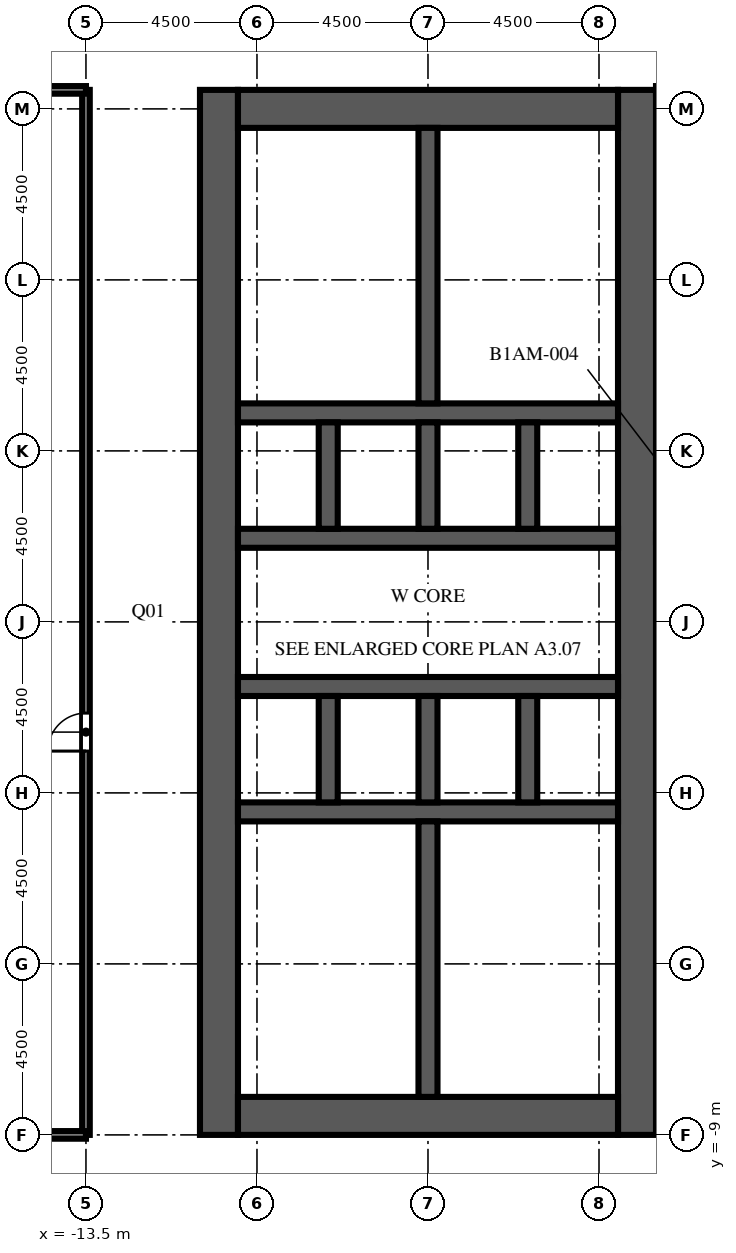
"""IFC4 building model, lengths in metres.
Left out: names, types, materials, properties, quantities, classifications, styles, units other than length and angle.
Written with IfcOpenShell. Run it as: python <this file> out.ifc"""

import sys

from ifc_helpers import new_model, si_unit, direction, frame, frame_2d, origin, place, context, subcontext, project, spatial, rectangle, extrude, element, fill, save


model = new_model("IFC4")
c1 = context("Model", 3, precision=1e-05, world=origin(), true_north=direction((0.0, 1.0)))
c2 = subcontext(c1, "Body", "Model", "MODEL_VIEW")
j1 = project(units=[si_unit("LENGTHUNIT", "METRE"), si_unit("PLANEANGLEUNIT", "RADIAN")], contexts=[c1])
p1 = place(None, origin())
s1 = spatial("IfcSite", under=j1, at=p1, CompositionType="ELEMENT")
p2 = place(p1, origin())
s2 = spatial("IfcBuilding", under=s1, at=p2, CompositionType="ELEMENT")
p3 = place(p2, frame((0.0, 0.0, 35.9)))
s3 = spatial("IfcBuildingStorey", under=s2, at=p3, CompositionType="ELEMENT", Elevation=35.9)
p4 = place(p3, frame((-10.0, -9.0, 0.0), z_axis=(0.0, 0.0, 1.0), x_axis=(0.0, 1.0, 0.0)))
e1 = element("IfcWall", 1, at=p4, inside=s3, PredefinedType="SHEAR", context=c2, shape_type="SweptSolid", body=[
    extrude(rectangle(XDim=27.5, YDim=1.0, at=frame_2d((13.75, 0.0))), origin(), (0.0, 0.0, 1.0), 6.0),
])
p5 = place(p4, frame((12.55, 0.0, 0.0)))
e2 = element("IfcOpeningElement", 2, at=p5, cuts=e1, PredefinedType="OPENING", context=c2, shape_type="SweptSolid", body=[
    extrude(rectangle(XDim=2.4, YDim=2.4, at=frame_2d((1.2, 1.2))), frame((0.0, 0.51, 0.0), z_axis=(0.0, -1.0, 0.0), x_axis=(1.0, 0.0, 0.0)), (0.0, 0.0, 1.0), 1.02),
])
p6 = place(p4, frame((6.825, 0.0, 0.0)))
e3 = element("IfcOpeningElement", 3, at=p6, cuts=e1, PredefinedType="OPENING", context=c2, shape_type="SweptSolid", body=[
    extrude(rectangle(XDim=1.2, YDim=2.1, at=frame_2d((0.6, 1.05))), frame((0.0, 0.51, 0.0), z_axis=(0.0, -1.0, 0.0), x_axis=(1.0, 0.0, 0.0)), (0.0, 0.0, 1.0), 1.02),
])
p7 = place(p4, frame((19.475, 0.0, 0.0)))
e4 = element("IfcOpeningElement", 4, at=p7, cuts=e1, PredefinedType="OPENING", context=c2, shape_type="SweptSolid", body=[
    extrude(rectangle(XDim=1.2, YDim=2.1, at=frame_2d((0.6, 1.05))), frame((0.0, 0.51, 0.0), z_axis=(0.0, -1.0, 0.0), x_axis=(1.0, 0.0, 0.0)), (0.0, 0.0, 1.0), 1.02),
])
p8 = place(p3, frame((1.0, -9.0, 0.0), z_axis=(0.0, 0.0, 1.0), x_axis=(0.0, 1.0, 0.0)))
e5 = element("IfcWall", 5, at=p8, inside=s3, PredefinedType="SHEAR", context=c2, shape_type="SweptSolid", body=[
    extrude(rectangle(XDim=27.5, YDim=1.0, at=frame_2d((13.75, 0.0))), origin(), (0.0, 0.0, 1.0), 6.0),
])
p9 = place(p8, frame((12.55, 0.0, 0.0)))
e6 = element("IfcOpeningElement", 6, at=p9, cuts=e5, PredefinedType="OPENING", context=c2, shape_type="SweptSolid", body=[
    extrude(rectangle(XDim=2.4, YDim=2.4, at=frame_2d((1.2, 1.2))), frame((0.0, 0.51, 0.0), z_axis=(0.0, -1.0, 0.0), x_axis=(1.0, 0.0, 0.0)), (0.0, 0.0, 1.0), 1.02),
])
p10 = place(p8, frame((4.025, 0.0, 0.0)))
e7 = element("IfcOpeningElement", 7, at=p10, cuts=e5, PredefinedType="OPENING", context=c2, shape_type="SweptSolid", body=[
    extrude(rectangle(XDim=1.2, YDim=2.1, at=frame_2d((0.6, 1.05))), frame((0.0, 0.51, 0.0), z_axis=(0.0, -1.0, 0.0), x_axis=(1.0, 0.0, 0.0)), (0.0, 0.0, 1.0), 1.02),
])
p11 = place(p8, frame((19.475, 0.0, 0.0)))
e8 = element("IfcOpeningElement", 8, at=p11, cuts=e5, PredefinedType="OPENING", context=c2, shape_type="SweptSolid", body=[
    extrude(rectangle(XDim=1.0, YDim=2.1, at=frame_2d((0.5, 1.05))), frame((0.0, 0.51, 0.0), z_axis=(0.0, -1.0, 0.0), x_axis=(1.0, 0.0, 0.0)), (0.0, 0.0, 1.0), 1.02),
])
p12 = place(p8, frame((21.106, 0.0, 0.0)))
e9 = element("IfcOpeningElement", 9, at=p12, cuts=e5, PredefinedType="OPENING", context=c2, shape_type="SweptSolid", body=[
    extrude(rectangle(XDim=1.0, YDim=2.1, at=frame_2d((0.5, 1.05))), frame((0.0, 0.51, 0.0), z_axis=(0.0, -1.0, 0.0), x_axis=(1.0, 0.0, 0.0)), (0.0, 0.0, 1.0), 1.02),
])
p13 = place(p8, frame((23.1, 0.0, 0.0)))
e10 = element("IfcOpeningElement", 10, at=p13, cuts=e5, PredefinedType="OPENING", context=c2, shape_type="SweptSolid", body=[
    extrude(rectangle(XDim=1.0, YDim=2.1, at=frame_2d((0.5, 1.05))), frame((0.0, 0.51, 0.0), z_axis=(0.0, -1.0, 0.0), x_axis=(1.0, 0.0, 0.0)), (0.0, 0.0, 1.0), 1.02),
])
p14 = place(p8, frame((25.094, 0.0, 0.0)))
e11 = element("IfcOpeningElement", 11, at=p14, cuts=e5, PredefinedType="OPENING", context=c2, shape_type="SweptSolid", body=[
    extrude(rectangle(XDim=1.0, YDim=2.1, at=frame_2d((0.5, 1.05))), frame((0.0, 0.51, 0.0), z_axis=(0.0, -1.0, 0.0), x_axis=(1.0, 0.0, 0.0)), (0.0, 0.0, 1.0), 1.02),
])
for number, where, z_axis, x_axis in (
    (12, (-9.5, -8.5, 0.0), (0.0, 0.0, 1.0), (1.0, 0.0, 0.0)),
    (13, (-9.5, 18.0, 0.0), (0.0, 0.0, 1.0), (1.0, 0.0, 0.0)),
):
    element("IfcWall", number, at=place(p3, frame(where, z_axis=z_axis, x_axis=x_axis)), inside=s3, PredefinedType="SHEAR", context=c2, shape_type="SweptSolid", body=[
        extrude(rectangle(XDim=10.0, YDim=1.0, at=frame_2d((5.0, 0.0))), origin(), (0.0, 0.0, 1.0), 6.0),
    ])
p15 = place(p3, frame((-9.5, -0.5, 0.0), z_axis=(0.0, 0.0, 1.0), x_axis=(1.0, 0.0, 0.0)))
e14 = element("IfcWall", 14, at=p15, inside=s3, PredefinedType="SHEAR", context=c2, shape_type="SweptSolid", body=[
    extrude(rectangle(XDim=10.0, YDim=0.5, at=frame_2d((5.0, 0.0))), origin(), (0.0, 0.0, 1.0), 6.0),
])
p16 = place(p3, frame((-9.5, 2.8, 0.0), z_axis=(0.0, 0.0, 1.0), x_axis=(1.0, 0.0, 0.0)))
e15 = element("IfcWall", 15, at=p16, inside=s3, PredefinedType="SHEAR", context=c2, shape_type="SweptSolid", body=[
    extrude(rectangle(XDim=10.0, YDim=0.5, at=frame_2d((5.0, 0.0))), origin(), (0.0, 0.0, 1.0), 6.0),
])
p17 = place(p16, frame((0.512, 0.0, 0.0)))
e16 = element("IfcOpeningElement", 16, at=p17, cuts=e15, PredefinedType="OPENING", context=c2, shape_type="SweptSolid", body=[
    extrude(rectangle(XDim=1.1, YDim=2.1, at=frame_2d((0.55, 1.05))), frame((0.0, 0.26, 0.0), z_axis=(0.0, -1.0, 0.0), x_axis=(1.0, 0.0, 0.0)), (0.0, 0.0, 1.0), 0.52),
])
p18 = place(p16, frame((3.137, 0.0, 0.0)))
e17 = element("IfcOpeningElement", 17, at=p18, cuts=e15, PredefinedType="OPENING", context=c2, shape_type="SweptSolid", body=[
    extrude(rectangle(XDim=1.1, YDim=2.1, at=frame_2d((0.55, 1.05))), frame((0.0, 0.26, 0.0), z_axis=(0.0, -1.0, 0.0), x_axis=(1.0, 0.0, 0.0)), (0.0, 0.0, 1.0), 0.52),
])
p19 = place(p16, frame((8.387, 0.0, 0.0)))
e18 = element("IfcOpeningElement", 18, at=p19, cuts=e15, PredefinedType="OPENING", context=c2, shape_type="SweptSolid", body=[
    extrude(rectangle(XDim=1.1, YDim=2.1, at=frame_2d((0.55, 1.05))), frame((0.0, 0.26, 0.0), z_axis=(0.0, -1.0, 0.0), x_axis=(1.0, 0.0, 0.0)), (0.0, 0.0, 1.0), 0.52),
])
p20 = place(p3, frame((-9.5, 6.7, 0.0), z_axis=(0.0, 0.0, 1.0), x_axis=(1.0, 0.0, 0.0)))
e19 = element("IfcWall", 19, at=p20, inside=s3, PredefinedType="SHEAR", context=c2, shape_type="SweptSolid", body=[
    extrude(rectangle(XDim=10.0, YDim=0.5, at=frame_2d((5.0, 0.0))), origin(), (0.0, 0.0, 1.0), 6.0),
])
p21 = place(p20, frame((0.512, 0.0, 0.0)))
e20 = element("IfcOpeningElement", 20, at=p21, cuts=e19, PredefinedType="OPENING", context=c2, shape_type="SweptSolid", body=[
    extrude(rectangle(XDim=1.1, YDim=2.1, at=frame_2d((0.55, 1.05))), frame((0.0, 0.26, 0.0), z_axis=(0.0, -1.0, 0.0), x_axis=(1.0, 0.0, 0.0)), (0.0, 0.0, 1.0), 0.52),
])
p22 = place(p20, frame((3.188, 0.0, 0.0)))
e21 = element("IfcOpeningElement", 21, at=p22, cuts=e19, PredefinedType="OPENING", context=c2, shape_type="SweptSolid", body=[
    extrude(rectangle(XDim=1.0, YDim=2.1, at=frame_2d((0.5, 1.05))), frame((0.0, 0.26, 0.0), z_axis=(0.0, -1.0, 0.0), x_axis=(1.0, 0.0, 0.0)), (0.0, 0.0, 1.0), 0.52),
])
p23 = place(p20, frame((5.812, 0.0, 0.0)))
e22 = element("IfcOpeningElement", 22, at=p23, cuts=e19, PredefinedType="OPENING", context=c2, shape_type="SweptSolid", body=[
    extrude(rectangle(XDim=1.0, YDim=2.1, at=frame_2d((0.5, 1.05))), frame((0.0, 0.26, 0.0), z_axis=(0.0, -1.0, 0.0), x_axis=(1.0, 0.0, 0.0)), (0.0, 0.0, 1.0), 0.52),
])
p24 = place(p20, frame((8.438, 0.0, 0.0)))
e23 = element("IfcOpeningElement", 23, at=p24, cuts=e19, PredefinedType="OPENING", context=c2, shape_type="SweptSolid", body=[
    extrude(rectangle(XDim=1.0, YDim=2.1, at=frame_2d((0.5, 1.05))), frame((0.0, 0.26, 0.0), z_axis=(0.0, -1.0, 0.0), x_axis=(1.0, 0.0, 0.0)), (0.0, 0.0, 1.0), 0.52),
])
p25 = place(p3, frame((-9.5, 10.0, 0.0), z_axis=(0.0, 0.0, 1.0), x_axis=(1.0, 0.0, 0.0)))
e24 = element("IfcWall", 24, at=p25, inside=s3, PredefinedType="SHEAR", context=c2, shape_type="SweptSolid", body=[
    extrude(rectangle(XDim=10.0, YDim=0.5, at=frame_2d((5.0, 0.0))), origin(), (0.0, 0.0, 1.0), 6.0),
])
for number, where, z_axis, x_axis in (
    (25, (-7.125, -0.25, 0.0), (0.0, 0.0, 1.0), (0.0, 1.0, 0.0)),
    (26, (-7.125, 6.95, 0.0), (0.0, 0.0, 1.0), (0.0, 1.0, 0.0)),
    (27, (-4.5, -0.25, 0.0), (0.0, 0.0, 1.0), (0.0, 1.0, 0.0)),
    (28, (-4.5, 6.95, 0.0), (0.0, 0.0, 1.0), (0.0, 1.0, 0.0)),
    (29, (-1.875, -0.25, 0.0), (0.0, 0.0, 1.0), (0.0, 1.0, 0.0)),
    (30, (-1.875, 6.95, 0.0), (0.0, 0.0, 1.0), (0.0, 1.0, 0.0)),
):
    element("IfcWall", number, at=place(p3, frame(where, z_axis=z_axis, x_axis=x_axis)), inside=s3, PredefinedType="SHEAR", context=c2, shape_type="SweptSolid", body=[
        extrude(rectangle(XDim=2.8, YDim=0.5, at=frame_2d((1.4, 0.0))), origin(), (0.0, 0.0, 1.0), 6.0),
    ])
for number, where, z_axis, x_axis in (
    (31, (-4.5, -8.0, 0.0), (0.0, 0.0, 1.0), (0.0, 1.0, 0.0)),
    (32, (-4.5, 10.25, 0.0), (0.0, 0.0, 1.0), (0.0, 1.0, 0.0)),
):
    element("IfcWall", number, at=place(p3, frame(where, z_axis=z_axis, x_axis=x_axis)), inside=s3, PredefinedType="SHEAR", context=c2, shape_type="SweptSolid", body=[
        extrude(rectangle(XDim=7.25, YDim=0.5, at=frame_2d((3.625, 0.0))), origin(), (0.0, 0.0, 1.0), 6.0),
    ])
p26 = place(p3, frame((-1.1, -5.825, 0.0), z_axis=(0.0, 0.0, 1.0), x_axis=(1.0, 0.0, 0.0)))
e33 = element("IfcWall", 33, at=p26, inside=s3, PredefinedType="PARTITIONING", context=c2, shape_type="SweptSolid", body=[
    extrude(rectangle(XDim=1.6, YDim=0.1, at=frame_2d((0.8, 0.0))), origin(), (0.0, 0.0, 1.0), 5.55),
])
p27 = place(p26, frame((0.3, 0.0, 0.0)))
e34 = element("IfcOpeningElement", 34, at=p27, cuts=e33, PredefinedType="OPENING", context=c2, shape_type="SweptSolid", body=[
    extrude(rectangle(XDim=1.0, YDim=2.1, at=frame_2d((0.5, 1.05))), frame((0.0, 0.06, 0.0), z_axis=(0.0, -1.0, 0.0), x_axis=(1.0, 0.0, 0.0)), (0.0, 0.0, 1.0), 0.12),
])
p28 = place(p3, frame((-1.1, -2.925, 0.0), z_axis=(0.0, 0.0, 1.0), x_axis=(1.0, 0.0, 0.0)))
e35 = element("IfcWall", 35, at=p28, inside=s3, PredefinedType="PARTITIONING", context=c2, shape_type="SweptSolid", body=[
    extrude(rectangle(XDim=1.6, YDim=0.1, at=frame_2d((0.8, 0.0))), origin(), (0.0, 0.0, 1.0), 5.55),
])
p29 = place(p28, frame((0.3, 0.0, 0.0)))
e36 = element("IfcOpeningElement", 36, at=p29, cuts=e35, PredefinedType="OPENING", context=c2, shape_type="SweptSolid", body=[
    extrude(rectangle(XDim=1.0, YDim=2.1, at=frame_2d((0.5, 1.05))), frame((0.0, 0.06, 0.0), z_axis=(0.0, -1.0, 0.0), x_axis=(1.0, 0.0, 0.0)), (0.0, 0.0, 1.0), 0.12),
])
p30 = place(p3, frame((-1.1, -5.825, 0.0), z_axis=(0.0, 0.0, 1.0), x_axis=(0.0, 1.0, 0.0)))
e37 = element("IfcWall", 37, at=p30, inside=s3, PredefinedType="PARTITIONING", context=c2, shape_type="SweptSolid", body=[
    extrude(rectangle(XDim=2.9, YDim=0.1, at=frame_2d((1.45, 0.0))), origin(), (0.0, 0.0, 1.0), 5.55),
])
p31 = place(p30, frame((0.95, 0.0, 0.0)))
e38 = element("IfcOpeningElement", 38, at=p31, cuts=e37, PredefinedType="OPENING", context=c2, shape_type="SweptSolid", body=[
    extrude(rectangle(XDim=1.0, YDim=2.1, at=frame_2d((0.5, 1.05))), frame((0.0, 0.06, 0.0), z_axis=(0.0, -1.0, 0.0), x_axis=(1.0, 0.0, 0.0)), (0.0, 0.0, 1.0), 0.12),
])
for number, where, z_axis, x_axis in (
    (39, (-4.25, -5.825, 0.0), (0.0, 0.0, 1.0), (1.0, 0.0, 0.0)),
    (40, (-4.25, -2.925, 0.0), (0.0, 0.0, 1.0), (1.0, 0.0, 0.0)),
):
    element("IfcWall", number, at=place(p3, frame(where, z_axis=z_axis, x_axis=x_axis)), inside=s3, PredefinedType="PARTITIONING", context=c2, shape_type="SweptSolid", body=[
        extrude(rectangle(XDim=3.15, YDim=0.1, at=frame_2d((1.575, 0.0))), origin(), (0.0, 0.0, 1.0), 5.55),
    ])
for number, where, z_axis, x_axis in (
    (41, (-4.25, 11.7, 0.0), (0.0, 0.0, 1.0), (1.0, 0.0, 0.0)),
    (42, (-4.25, 13.512, 0.0), (0.0, 0.0, 1.0), (1.0, 0.0, 0.0)),
    (43, (-4.25, 15.688, 0.0), (0.0, 0.0, 1.0), (1.0, 0.0, 0.0)),
):
    element("IfcWall", number, at=place(p3, frame(where, z_axis=z_axis, x_axis=x_axis)), inside=s3, PredefinedType="PARTITIONING", context=c2, shape_type="SweptSolid", body=[
        extrude(rectangle(XDim=4.75, YDim=0.1, at=frame_2d((2.375, 0.0))), origin(), (0.0, 0.0, 1.0), 5.55),
    ])
p32 = place(p3, frame((-13.5, -9.0, 0.0), z_axis=(0.0, 0.0, 1.0), x_axis=(0.0, 1.0, 0.0)))
e44 = element("IfcWall", 44, at=p32, inside=s3, PredefinedType="PARTITIONING", context=c2, shape_type="SweptSolid", body=[
    extrude(rectangle(XDim=27.5, YDim=0.2, at=frame_2d((13.75, 0.0))), origin(), (0.0, 0.0, 1.0), 5.55),
])
p33 = place(p32, frame((10.1, 0.0, 0.0)))
e45 = element("IfcOpeningElement", 45, at=p33, cuts=e44, PredefinedType="OPENING", context=c2, shape_type="SweptSolid", body=[
    extrude(rectangle(XDim=1.0, YDim=2.1, at=frame_2d((0.5, 1.05))), frame((0.0, 0.11, 0.0), z_axis=(0.0, -1.0, 0.0), x_axis=(1.0, 0.0, 0.0)), (0.0, 0.0, 1.0), 0.22),
])
for number, where, z_axis, x_axis in (
    (46, (-17.2, -9.0, 0.0), (0.0, 0.0, 1.0), (1.0, 0.0, 0.0)),
    (47, (-17.2, 18.5, 0.0), (0.0, 0.0, 1.0), (1.0, 0.0, 0.0)),
):
    element("IfcWall", number, at=place(p3, frame(where, z_axis=z_axis, x_axis=x_axis)), inside=s3, PredefinedType="PARTITIONING", context=c2, shape_type="SweptSolid", body=[
        extrude(rectangle(XDim=3.7, YDim=0.2, at=frame_2d((1.85, 0.0))), origin(), (0.0, 0.0, 1.0), 5.55),
    ])
p34 = place(p17, origin())
e48 = element("IfcDoor", 48, at=p34, inside=s3, OperationType="DOUBLE_DOOR_SLIDING", PredefinedType="DOOR", context=c2, shape_type="SweptSolid", body=[
    extrude(rectangle(XDim=1.1, YDim=2.1, at=frame_2d((0.55, 1.05))), frame((0.0, 0.025, 0.0), z_axis=(0.0, -1.0, 0.0), x_axis=(1.0, 0.0, 0.0)), (0.0, 0.0, 1.0), 0.05),
])
fill(e16, e48)
p35 = place(p18, origin())
e49 = element("IfcDoor", 49, at=p35, inside=s3, OperationType="DOUBLE_DOOR_SLIDING", PredefinedType="DOOR", context=c2, shape_type="SweptSolid", body=[
    extrude(rectangle(XDim=1.1, YDim=2.1, at=frame_2d((0.55, 1.05))), frame((0.0, 0.025, 0.0), z_axis=(0.0, -1.0, 0.0), x_axis=(1.0, 0.0, 0.0)), (0.0, 0.0, 1.0), 0.05),
])
fill(e17, e49)
p36 = place(p19, origin())
e50 = element("IfcDoor", 50, at=p36, inside=s3, OperationType="DOUBLE_DOOR_SLIDING", PredefinedType="DOOR", context=c2, shape_type="SweptSolid", body=[
    extrude(rectangle(XDim=1.1, YDim=2.1, at=frame_2d((0.55, 1.05))), frame((0.0, 0.025, 0.0), z_axis=(0.0, -1.0, 0.0), x_axis=(1.0, 0.0, 0.0)), (0.0, 0.0, 1.0), 0.05),
])
fill(e18, e50)
p37 = place(p21, origin())
e51 = element("IfcDoor", 51, at=p37, inside=s3, OperationType="DOUBLE_DOOR_SLIDING", PredefinedType="DOOR", context=c2, shape_type="SweptSolid", body=[
    extrude(rectangle(XDim=1.1, YDim=2.1, at=frame_2d((0.55, 1.05))), frame((0.0, 0.025, 0.0), z_axis=(0.0, -1.0, 0.0), x_axis=(1.0, 0.0, 0.0)), (0.0, 0.0, 1.0), 0.05),
])
fill(e20, e51)
p38 = place(p5, origin())
e52 = element("IfcDoor", 52, at=p38, inside=s3, OperationType="DOUBLE_DOOR_DOUBLE_SWING", PredefinedType="DOOR", context=c2, shape_type="SweptSolid", body=[
    extrude(rectangle(XDim=2.4, YDim=2.4, at=frame_2d((1.2, 1.2))), frame((0.0, 0.025, 0.0), z_axis=(0.0, -1.0, 0.0), x_axis=(1.0, 0.0, 0.0)), (0.0, 0.0, 1.0), 0.05),
])
fill(e2, e52)
p39 = place(p9, origin())
e53 = element("IfcDoor", 53, at=p39, inside=s3, OperationType="DOUBLE_DOOR_DOUBLE_SWING", PredefinedType="DOOR", context=c2, shape_type="SweptSolid", body=[
    extrude(rectangle(XDim=2.4, YDim=2.4, at=frame_2d((1.2, 1.2))), frame((0.0, 0.025, 0.0), z_axis=(0.0, -1.0, 0.0), x_axis=(1.0, 0.0, 0.0)), (0.0, 0.0, 1.0), 0.05),
])
fill(e6, e53)
p40 = place(p6, origin())
e54 = element("IfcDoor", 54, at=p40, inside=s3, OperationType="SINGLE_SWING_LEFT", PredefinedType="DOOR", context=c2, shape_type="SweptSolid", body=[
    extrude(rectangle(XDim=1.2, YDim=2.1, at=frame_2d((0.6, 1.05))), frame((0.0, 0.025, 0.0), z_axis=(0.0, -1.0, 0.0), x_axis=(1.0, 0.0, 0.0)), (0.0, 0.0, 1.0), 0.05),
])
fill(e3, e54)
p41 = place(p7, origin())
e55 = element("IfcDoor", 55, at=p41, inside=s3, OperationType="SINGLE_SWING_LEFT", PredefinedType="DOOR", context=c2, shape_type="SweptSolid", body=[
    extrude(rectangle(XDim=1.2, YDim=2.1, at=frame_2d((0.6, 1.05))), frame((0.0, 0.025, 0.0), z_axis=(0.0, -1.0, 0.0), x_axis=(1.0, 0.0, 0.0)), (0.0, 0.0, 1.0), 0.05),
])
fill(e4, e55)
p42 = place(p22, origin())
e56 = element("IfcDoor", 56, at=p42, inside=s3, OperationType="SINGLE_SWING_RIGHT", PredefinedType="DOOR", context=c2, shape_type="SweptSolid", body=[
    extrude(rectangle(XDim=1.0, YDim=2.1, at=frame_2d((0.5, 1.05))), frame((0.0, 0.025, 0.0), z_axis=(0.0, -1.0, 0.0), x_axis=(1.0, 0.0, 0.0)), (0.0, 0.0, 1.0), 0.05),
])
fill(e21, e56)
p43 = place(p23, origin())
e57 = element("IfcDoor", 57, at=p43, inside=s3, OperationType="SINGLE_SWING_LEFT", PredefinedType="DOOR", context=c2, shape_type="SweptSolid", body=[
    extrude(rectangle(XDim=1.0, YDim=2.1, at=frame_2d((0.5, 1.05))), frame((0.0, 0.025, 0.0), z_axis=(0.0, -1.0, 0.0), x_axis=(1.0, 0.0, 0.0)), (0.0, 0.0, 1.0), 0.05),
])
fill(e22, e57)
p44 = place(p24, origin())
e58 = element("IfcDoor", 58, at=p44, inside=s3, OperationType="SINGLE_SWING_RIGHT", PredefinedType="DOOR", context=c2, shape_type="SweptSolid", body=[
    extrude(rectangle(XDim=1.0, YDim=2.1, at=frame_2d((0.5, 1.05))), frame((0.0, 0.025, 0.0), z_axis=(0.0, -1.0, 0.0), x_axis=(1.0, 0.0, 0.0)), (0.0, 0.0, 1.0), 0.05),
])
fill(e23, e58)
p45 = place(p10, origin())
e59 = element("IfcDoor", 59, at=p45, inside=s3, OperationType="SINGLE_SWING_LEFT", PredefinedType="DOOR", context=c2, shape_type="SweptSolid", body=[
    extrude(rectangle(XDim=1.2, YDim=2.1, at=frame_2d((0.6, 1.05))), frame((0.0, 0.475, 0.0), z_axis=(0.0, -1.0, 0.0), x_axis=(1.0, 0.0, 0.0)), (0.0, 0.0, 1.0), 0.05),
])
fill(e7, e59)
p46 = place(p27, origin())
e60 = element("IfcDoor", 60, at=p46, inside=s3, OperationType="SINGLE_SWING_RIGHT", PredefinedType="DOOR", context=c2, shape_type="SweptSolid", body=[
    extrude(rectangle(XDim=1.0, YDim=2.1, at=frame_2d((0.5, 1.05))), frame((0.0, 0.025, 0.0), z_axis=(0.0, -1.0, 0.0), x_axis=(1.0, 0.0, 0.0)), (0.0, 0.0, 1.0), 0.05),
])
fill(e34, e60)
p47 = place(p29, origin())
e61 = element("IfcDoor", 61, at=p47, inside=s3, OperationType="SINGLE_SWING_LEFT", PredefinedType="DOOR", context=c2, shape_type="SweptSolid", body=[
    extrude(rectangle(XDim=1.0, YDim=2.1, at=frame_2d((0.5, 1.05))), frame((0.0, 0.025, 0.0), z_axis=(0.0, -1.0, 0.0), x_axis=(1.0, 0.0, 0.0)), (0.0, 0.0, 1.0), 0.05),
])
fill(e36, e61)
p48 = place(p31, origin())
e62 = element("IfcDoor", 62, at=p48, inside=s3, OperationType="SINGLE_SWING_RIGHT", PredefinedType="DOOR", context=c2, shape_type="SweptSolid", body=[
    extrude(rectangle(XDim=1.0, YDim=2.1, at=frame_2d((0.5, 1.05))), frame((0.0, 0.025, 0.0), z_axis=(0.0, -1.0, 0.0), x_axis=(1.0, 0.0, 0.0)), (0.0, 0.0, 1.0), 0.05),
])
fill(e38, e62)
p49 = place(p11, origin())
e63 = element("IfcDoor", 63, at=p49, inside=s3, OperationType="SINGLE_SWING_LEFT", PredefinedType="DOOR", context=c2, shape_type="SweptSolid", body=[
    extrude(rectangle(XDim=1.0, YDim=2.1, at=frame_2d((0.5, 1.05))), frame((0.0, 0.475, 0.0), z_axis=(0.0, -1.0, 0.0), x_axis=(1.0, 0.0, 0.0)), (0.0, 0.0, 1.0), 0.05),
])
fill(e8, e63)
p50 = place(p12, origin())
e64 = element("IfcDoor", 64, at=p50, inside=s3, OperationType="SINGLE_SWING_RIGHT", PredefinedType="DOOR", context=c2, shape_type="SweptSolid", body=[
    extrude(rectangle(XDim=1.0, YDim=2.1, at=frame_2d((0.5, 1.05))), frame((0.0, 0.475, 0.0), z_axis=(0.0, -1.0, 0.0), x_axis=(1.0, 0.0, 0.0)), (0.0, 0.0, 1.0), 0.05),
])
fill(e9, e64)
p51 = place(p13, origin())
e65 = element("IfcDoor", 65, at=p51, inside=s3, OperationType="SINGLE_SWING_LEFT", PredefinedType="DOOR", context=c2, shape_type="SweptSolid", body=[
    extrude(rectangle(XDim=1.0, YDim=2.1, at=frame_2d((0.5, 1.05))), frame((0.0, 0.475, 0.0), z_axis=(0.0, -1.0, 0.0), x_axis=(1.0, 0.0, 0.0)), (0.0, 0.0, 1.0), 0.05),
])
fill(e10, e65)
p52 = place(p14, origin())
e66 = element("IfcDoor", 66, at=p52, inside=s3, OperationType="SINGLE_SWING_RIGHT", PredefinedType="DOOR", context=c2, shape_type="SweptSolid", body=[
    extrude(rectangle(XDim=1.0, YDim=2.1, at=frame_2d((0.5, 1.05))), frame((0.0, 0.475, 0.0), z_axis=(0.0, -1.0, 0.0), x_axis=(1.0, 0.0, 0.0)), (0.0, 0.0, 1.0), 0.05),
])
fill(e11, e66)
p53 = place(p33, origin())
e67 = element("IfcDoor", 67, at=p53, inside=s3, OperationType="SINGLE_SWING_LEFT", PredefinedType="DOOR", context=c2, shape_type="SweptSolid", body=[
    extrude(rectangle(XDim=1.0, YDim=2.1, at=frame_2d((0.5, 1.05))), frame((0.0, 0.025, 0.0), z_axis=(0.0, -1.0, 0.0), x_axis=(1.0, 0.0, 0.0)), (0.0, 0.0, 1.0), 0.05),
])
fill(e45, e67)
save(model, sys.argv[1])
